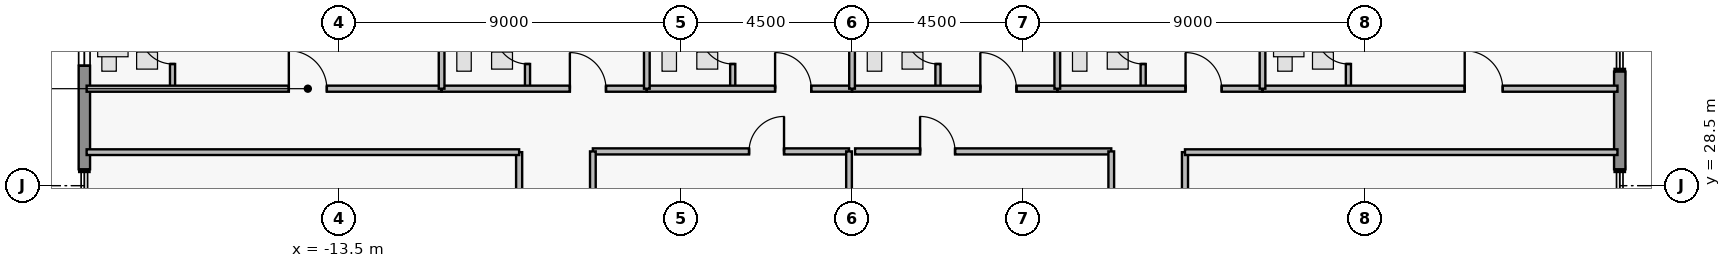
"""IFC4 building model, lengths in metres.
Left out: names, types, materials, properties, quantities, classifications, styles, units other than length and angle.
Written with IfcOpenShell. Run it as: python <this file> out.ifc"""

import sys

from ifc_helpers import new_model, si_unit, direction, frame, frame_2d, origin, place, context, subcontext, project, spatial, rectangle, extrude, element, fill, save


model = new_model("IFC4")
c1 = context("Model", 3, precision=1e-05, world=origin(), true_north=direction((0.0, 1.0)))
c2 = subcontext(c1, "Body", "Model", "MODEL_VIEW")
j1 = project(units=[si_unit("LENGTHUNIT", "METRE"), si_unit("PLANEANGLEUNIT", "RADIAN")], contexts=[c1])
p1 = place(None, origin())
s1 = spatial("IfcSite", under=j1, at=p1, CompositionType="ELEMENT")
p2 = place(p1, origin())
s2 = spatial("IfcBuilding", under=s1, at=p2, CompositionType="ELEMENT")
p3 = place(p2, frame((0.0, 0.0, 272.95)))
s3 = spatial("IfcBuildingStorey", under=s2, at=p3, CompositionType="ELEMENT", Elevation=272.95)
p4 = place(p3, frame((-20.2, 28.93, 0.0), z_axis=(0.0, 0.0, 1.0), x_axis=(0.0, 1.0, 0.0)))
e1 = element("IfcWall", 1, at=p4, inside=s3, PredefinedType="STANDARD", context=c2, shape_type="SweptSolid", body=[
    extrude(rectangle(XDim=6.67, YDim=0.3, at=frame_2d((3.335, 0.0))), origin(), (0.0, 0.0, 1.0), 3.48),
])
p5 = place(p4, frame((2.725, 0.0, 0.95)))
e2 = element("IfcOpeningElement", 2, at=p5, cuts=e1, PredefinedType="OPENING", context=c2, shape_type="SweptSolid", body=[
    extrude(rectangle(XDim=1.15, YDim=1.55, at=frame_2d((0.575, 0.775))), frame((0.0, 0.16, 0.0), z_axis=(0.0, -1.0, 0.0), x_axis=(1.0, 0.0, 0.0)), (0.0, 0.0, 1.0), 0.32),
])
p6 = place(p4, frame((4.94, 0.0, 0.95)))
e3 = element("IfcOpeningElement", 3, at=p6, cuts=e1, PredefinedType="OPENING", context=c2, shape_type="SweptSolid", body=[
    extrude(rectangle(XDim=1.15, YDim=1.55, at=frame_2d((0.575, 0.775))), frame((0.0, 0.16, 0.0), z_axis=(0.0, -1.0, 0.0), x_axis=(1.0, 0.0, 0.0)), (0.0, 0.0, 1.0), 0.32),
])
p7 = place(p3, frame((20.2, 31.5, 0.0), z_axis=(0.0, 0.0, 1.0), x_axis=(0.0, -1.0, 0.0)))
e4 = element("IfcWall", 4, at=p7, inside=s3, PredefinedType="STANDARD", context=c2, shape_type="SweptSolid", body=[
    extrude(rectangle(XDim=2.57, YDim=0.3, at=frame_2d((1.285, 0.0))), origin(), (0.0, 0.0, 1.0), 3.48),
])
p8 = place(p3, frame((-17.88, 31.05, 0.0), z_axis=(0.0, 0.0, 1.0), x_axis=(0.0, 1.0, 0.0)))
e5 = element("IfcWall", 5, at=p8, inside=s3, PredefinedType="PLUMBINGWALL", context=c2, shape_type="SweptSolid", body=[
    extrude(rectangle(XDim=2.36, YDim=0.135, at=frame_2d((1.18, 0.0))), origin(), (0.0, 0.0, 1.0), 3.48),
])
p9 = place(p8, frame((0.65, 0.0, 0.0)))
e6 = element("IfcOpeningElement", 6, at=p9, cuts=e5, PredefinedType="OPENING", context=c2, shape_type="SweptSolid", body=[
    extrude(rectangle(XDim=0.85, YDim=2.1, at=frame_2d((0.425, 1.05))), frame((0.0, 0.077, 0.0), z_axis=(0.0, -1.0, 0.0), x_axis=(1.0, 0.0, 0.0)), (0.0, 0.0, 1.0), 0.155),
])
p10 = place(p3, frame((-20.14, 31.05, 0.0), z_axis=(0.0, 0.0, 1.0), x_axis=(1.0, 0.0, 0.0)))
e7 = element("IfcWall", 7, at=p10, inside=s3, PredefinedType="PARTITIONING", context=c2, shape_type="SweptSolid", body=[
    extrude(rectangle(XDim=9.34, YDim=0.16, at=frame_2d((4.67, 0.0))), origin(), (0.0, 0.0, 1.0), 3.48),
])
p11 = place(p10, frame((5.32, 0.0, 0.0)))
e8 = element("IfcOpeningElement", 8, at=p11, cuts=e7, PredefinedType="OPENING", context=c2, shape_type="SweptSolid", body=[
    extrude(rectangle(XDim=1.0, YDim=2.15, at=frame_2d((0.5, 1.075))), frame((0.0, 0.09, 0.0), z_axis=(0.0, -1.0, 0.0), x_axis=(1.0, 0.0, 0.0)), (0.0, 0.0, 1.0), 0.18),
])
p12 = place(p3, frame((-8.54, 31.05, 0.0), z_axis=(0.0, 0.0, 1.0), x_axis=(0.0, 1.0, 0.0)))
e9 = element("IfcWall", 9, at=p12, inside=s3, PredefinedType="PLUMBINGWALL", context=c2, shape_type="SweptSolid", body=[
    extrude(rectangle(XDim=2.36, YDim=0.135, at=frame_2d((1.18, 0.0))), origin(), (0.0, 0.0, 1.0), 3.48),
])
p13 = place(p12, frame((0.65, 0.0, 0.0)))
e10 = element("IfcOpeningElement", 10, at=p13, cuts=e9, PredefinedType="OPENING", context=c2, shape_type="SweptSolid", body=[
    extrude(rectangle(XDim=0.85, YDim=2.1, at=frame_2d((0.425, 1.05))), frame((0.0, 0.077, 0.0), z_axis=(0.0, -1.0, 0.0), x_axis=(1.0, 0.0, 0.0)), (0.0, 0.0, 1.0), 0.155),
])
p14 = place(p3, frame((-10.8, 31.05, 0.0), z_axis=(0.0, 0.0, 1.0), x_axis=(1.0, 0.0, 0.0)))
e11 = element("IfcWall", 11, at=p14, inside=s3, PredefinedType="PARTITIONING", context=c2, shape_type="SweptSolid", body=[
    extrude(rectangle(XDim=5.4, YDim=0.16, at=frame_2d((2.7, 0.0))), origin(), (0.0, 0.0, 1.0), 3.48),
])
p15 = place(p14, frame((3.375, 0.0, 0.0)))
e12 = element("IfcOpeningElement", 12, at=p15, cuts=e11, PredefinedType="OPENING", context=c2, shape_type="SweptSolid", body=[
    extrude(rectangle(XDim=0.95, YDim=2.15, at=frame_2d((0.475, 1.075))), frame((0.0, 0.09, 0.0), z_axis=(0.0, -1.0, 0.0), x_axis=(1.0, 0.0, 0.0)), (0.0, 0.0, 1.0), 0.18),
])
p16 = place(p3, frame((-3.14, 31.05, 0.0), z_axis=(0.0, 0.0, 1.0), x_axis=(0.0, 1.0, 0.0)))
e13 = element("IfcWall", 13, at=p16, inside=s3, PredefinedType="PLUMBINGWALL", context=c2, shape_type="SweptSolid", body=[
    extrude(rectangle(XDim=2.36, YDim=0.135, at=frame_2d((1.18, 0.0))), origin(), (0.0, 0.0, 1.0), 3.48),
])
p17 = place(p16, frame((0.65, 0.0, 0.0)))
e14 = element("IfcOpeningElement", 14, at=p17, cuts=e13, PredefinedType="OPENING", context=c2, shape_type="SweptSolid", body=[
    extrude(rectangle(XDim=0.85, YDim=2.1, at=frame_2d((0.425, 1.05))), frame((0.0, 0.077, 0.0), z_axis=(0.0, -1.0, 0.0), x_axis=(1.0, 0.0, 0.0)), (0.0, 0.0, 1.0), 0.155),
])
p18 = place(p3, frame((-5.4, 31.05, 0.0), z_axis=(0.0, 0.0, 1.0), x_axis=(1.0, 0.0, 0.0)))
e15 = element("IfcWall", 15, at=p18, inside=s3, PredefinedType="PARTITIONING", context=c2, shape_type="SweptSolid", body=[
    extrude(rectangle(XDim=5.4, YDim=0.16, at=frame_2d((2.7, 0.0))), origin(), (0.0, 0.0, 1.0), 3.48),
])
p19 = place(p18, frame((3.375, 0.0, 0.0)))
e16 = element("IfcOpeningElement", 16, at=p19, cuts=e15, PredefinedType="OPENING", context=c2, shape_type="SweptSolid", body=[
    extrude(rectangle(XDim=0.95, YDim=2.15, at=frame_2d((0.475, 1.075))), frame((0.0, 0.09, 0.0), z_axis=(0.0, -1.0, 0.0), x_axis=(1.0, 0.0, 0.0)), (0.0, 0.0, 1.0), 0.18),
])
p20 = place(p3, frame((2.26, 31.05, 0.0), z_axis=(0.0, 0.0, 1.0), x_axis=(0.0, 1.0, 0.0)))
e17 = element("IfcWall", 17, at=p20, inside=s3, PredefinedType="PLUMBINGWALL", context=c2, shape_type="SweptSolid", body=[
    extrude(rectangle(XDim=2.36, YDim=0.135, at=frame_2d((1.18, 0.0))), origin(), (0.0, 0.0, 1.0), 3.48),
])
p21 = place(p20, frame((0.65, 0.0, 0.0)))
e18 = element("IfcOpeningElement", 18, at=p21, cuts=e17, PredefinedType="OPENING", context=c2, shape_type="SweptSolid", body=[
    extrude(rectangle(XDim=0.85, YDim=2.1, at=frame_2d((0.425, 1.05))), frame((0.0, 0.077, 0.0), z_axis=(0.0, -1.0, 0.0), x_axis=(1.0, 0.0, 0.0)), (0.0, 0.0, 1.0), 0.155),
])
p22 = place(p3, frame((0.0, 31.05, 0.0), z_axis=(0.0, 0.0, 1.0), x_axis=(1.0, 0.0, 0.0)))
e19 = element("IfcWall", 19, at=p22, inside=s3, PredefinedType="PARTITIONING", context=c2, shape_type="SweptSolid", body=[
    extrude(rectangle(XDim=5.4, YDim=0.16, at=frame_2d((2.7, 0.0))), origin(), (0.0, 0.0, 1.0), 3.48),
])
p23 = place(p22, frame((3.375, 0.0, 0.0)))
e20 = element("IfcOpeningElement", 20, at=p23, cuts=e19, PredefinedType="OPENING", context=c2, shape_type="SweptSolid", body=[
    extrude(rectangle(XDim=0.95, YDim=2.15, at=frame_2d((0.475, 1.075))), frame((0.0, 0.09, 0.0), z_axis=(0.0, -1.0, 0.0), x_axis=(1.0, 0.0, 0.0)), (0.0, 0.0, 1.0), 0.18),
])
p24 = place(p3, frame((7.66, 31.05, 0.0), z_axis=(0.0, 0.0, 1.0), x_axis=(0.0, 1.0, 0.0)))
e21 = element("IfcWall", 21, at=p24, inside=s3, PredefinedType="PLUMBINGWALL", context=c2, shape_type="SweptSolid", body=[
    extrude(rectangle(XDim=2.36, YDim=0.135, at=frame_2d((1.18, 0.0))), origin(), (0.0, 0.0, 1.0), 3.48),
])
p25 = place(p24, frame((0.65, 0.0, 0.0)))
e22 = element("IfcOpeningElement", 22, at=p25, cuts=e21, PredefinedType="OPENING", context=c2, shape_type="SweptSolid", body=[
    extrude(rectangle(XDim=0.85, YDim=2.1, at=frame_2d((0.425, 1.05))), frame((0.0, 0.077, 0.0), z_axis=(0.0, -1.0, 0.0), x_axis=(1.0, 0.0, 0.0)), (0.0, 0.0, 1.0), 0.155),
])
p26 = place(p3, frame((5.4, 31.05, 0.0), z_axis=(0.0, 0.0, 1.0), x_axis=(1.0, 0.0, 0.0)))
e23 = element("IfcWall", 23, at=p26, inside=s3, PredefinedType="PARTITIONING", context=c2, shape_type="SweptSolid", body=[
    extrude(rectangle(XDim=5.4, YDim=0.16, at=frame_2d((2.7, 0.0))), origin(), (0.0, 0.0, 1.0), 3.48),
])
p27 = place(p26, frame((3.375, 0.0, 0.0)))
e24 = element("IfcOpeningElement", 24, at=p27, cuts=e23, PredefinedType="OPENING", context=c2, shape_type="SweptSolid", body=[
    extrude(rectangle(XDim=0.95, YDim=2.15, at=frame_2d((0.475, 1.075))), frame((0.0, 0.09, 0.0), z_axis=(0.0, -1.0, 0.0), x_axis=(1.0, 0.0, 0.0)), (0.0, 0.0, 1.0), 0.18),
])
p28 = place(p3, frame((13.06, 31.05, 0.0), z_axis=(0.0, 0.0, 1.0), x_axis=(0.0, 1.0, 0.0)))
e25 = element("IfcWall", 25, at=p28, inside=s3, PredefinedType="PLUMBINGWALL", context=c2, shape_type="SweptSolid", body=[
    extrude(rectangle(XDim=2.36, YDim=0.135, at=frame_2d((1.18, 0.0))), origin(), (0.0, 0.0, 1.0), 3.48),
])
p29 = place(p28, frame((0.65, 0.0, 0.0)))
e26 = element("IfcOpeningElement", 26, at=p29, cuts=e25, PredefinedType="OPENING", context=c2, shape_type="SweptSolid", body=[
    extrude(rectangle(XDim=0.85, YDim=2.1, at=frame_2d((0.425, 1.05))), frame((0.0, 0.077, 0.0), z_axis=(0.0, -1.0, 0.0), x_axis=(1.0, 0.0, 0.0)), (0.0, 0.0, 1.0), 0.155),
])
p30 = place(p3, frame((10.8, 31.05, 0.0), z_axis=(0.0, 0.0, 1.0), x_axis=(1.0, 0.0, 0.0)))
e27 = element("IfcWall", 27, at=p30, inside=s3, PredefinedType="PARTITIONING", context=c2, shape_type="SweptSolid", body=[
    extrude(rectangle(XDim=9.34, YDim=0.16, at=frame_2d((4.67, 0.0))), origin(), (0.0, 0.0, 1.0), 3.48),
])
p31 = place(p30, frame((5.32, 0.0, 0.0)))
e28 = element("IfcOpeningElement", 28, at=p31, cuts=e27, PredefinedType="OPENING", context=c2, shape_type="SweptSolid", body=[
    extrude(rectangle(XDim=1.0, YDim=2.15, at=frame_2d((0.5, 1.075))), frame((0.0, 0.09, 0.0), z_axis=(0.0, -1.0, 0.0), x_axis=(1.0, 0.0, 0.0)), (0.0, 0.0, 1.0), 0.18),
])
p32 = place(p3, frame((-6.82, 29.4, 0.0), z_axis=(0.0, 0.0, 1.0), x_axis=(1.0, 0.0, 0.0)))
e29 = element("IfcWall", 29, at=p32, inside=s3, PredefinedType="PARTITIONING", context=c2, shape_type="SweptSolid", body=[
    extrude(rectangle(XDim=6.74, YDim=0.16, at=frame_2d((3.37, 0.0))), origin(), (0.0, 0.0, 1.0), 3.48),
])
p33 = place(p32, frame((4.11, 0.0, 0.0)))
e30 = element("IfcOpeningElement", 30, at=p33, cuts=e29, PredefinedType="OPENING", context=c2, shape_type="SweptSolid", body=[
    extrude(rectangle(XDim=0.92, YDim=2.12, at=frame_2d((0.46, 1.06))), frame((0.0, 0.09, 0.0), z_axis=(0.0, -1.0, 0.0), x_axis=(1.0, 0.0, 0.0)), (0.0, 0.0, 1.0), 0.18),
])
p34 = place(p3, frame((0.08, 29.4, 0.0), z_axis=(0.0, 0.0, 1.0), x_axis=(1.0, 0.0, 0.0)))
e31 = element("IfcWall", 31, at=p34, inside=s3, PredefinedType="PARTITIONING", context=c2, shape_type="SweptSolid", body=[
    extrude(rectangle(XDim=6.74, YDim=0.16, at=frame_2d((3.37, 0.0))), origin(), (0.0, 0.0, 1.0), 3.48),
])
p35 = place(p34, frame((1.71, 0.0, 0.0)))
e32 = element("IfcOpeningElement", 32, at=p35, cuts=e31, PredefinedType="OPENING", context=c2, shape_type="SweptSolid", body=[
    extrude(rectangle(XDim=0.92, YDim=2.12, at=frame_2d((0.46, 1.06))), frame((0.0, 0.09, 0.0), z_axis=(0.0, -1.0, 0.0), x_axis=(1.0, 0.0, 0.0)), (0.0, 0.0, 1.0), 0.18),
])
p36 = place(p3, frame((-8.76, 23.81, 0.0), z_axis=(0.0, 0.0, 1.0), x_axis=(0.0, 1.0, 0.0)))
e33 = element("IfcWall", 33, at=p36, inside=s3, PredefinedType="PARTITIONING", context=c2, shape_type="SweptSolid", body=[
    extrude(rectangle(XDim=5.57, YDim=0.16, at=frame_2d((2.785, 0.0))), origin(), (0.0, 0.0, 1.0), 3.48),
])
p37 = place(p36, frame((2.325, 0.0, 0.0)))
e34 = element("IfcOpeningElement", 34, at=p37, cuts=e33, PredefinedType="OPENING", context=c2, shape_type="SweptSolid", body=[
    extrude(rectangle(XDim=0.92, YDim=2.12, at=frame_2d((0.46, 1.06))), frame((0.0, 0.09, 0.0), z_axis=(0.0, -1.0, 0.0), x_axis=(1.0, 0.0, 0.0)), (0.0, 0.0, 1.0), 0.18),
])
p38 = place(p3, frame((8.76, 23.81, 0.0), z_axis=(0.0, 0.0, 1.0), x_axis=(0.0, 1.0, 0.0)))
e35 = element("IfcWall", 35, at=p38, inside=s3, PredefinedType="PARTITIONING", context=c2, shape_type="SweptSolid", body=[
    extrude(rectangle(XDim=5.57, YDim=0.16, at=frame_2d((2.785, 0.0))), origin(), (0.0, 0.0, 1.0), 3.48),
])
p39 = place(p38, frame((2.325, 0.0, 0.0)))
e36 = element("IfcOpeningElement", 36, at=p39, cuts=e35, PredefinedType="OPENING", context=c2, shape_type="SweptSolid", body=[
    extrude(rectangle(XDim=0.92, YDim=2.12, at=frame_2d((0.46, 1.06))), frame((0.0, 0.09, 0.0), z_axis=(0.0, -1.0, 0.0), x_axis=(1.0, 0.0, 0.0)), (0.0, 0.0, 1.0), 0.18),
])
for number, where, z_axis, x_axis in (
    (37, (-10.8, 31.05, 0.0), (0.0, 0.0, 1.0), (0.0, 1.0, 0.0)),
    (38, (-5.4, 31.05, 0.0), (0.0, 0.0, 1.0), (0.0, 1.0, 0.0)),
    (39, (0.0, 31.05, 0.0), (0.0, 0.0, 1.0), (0.0, 1.0, 0.0)),
    (40, (5.4, 31.05, 0.0), (0.0, 0.0, 1.0), (0.0, 1.0, 0.0)),
    (41, (10.8, 31.05, 0.0), (0.0, 0.0, 1.0), (0.0, 1.0, 0.0)),
):
    element("IfcWall", number, at=place(p3, frame(where, z_axis=z_axis, x_axis=x_axis)), inside=s3, PredefinedType="PARTITIONING", context=c2, shape_type="SweptSolid", body=[
        extrude(rectangle(XDim=7.87, YDim=0.15, at=frame_2d((3.935, 0.0))), origin(), (0.0, 0.0, 1.0), 3.48),
    ])
for number, where, z_axis, x_axis in (
    (42, (-6.82, 27.0, 0.0), (0.0, 0.0, 1.0), (0.0, 1.0, 0.0)),
    (43, (-0.08, 27.0, 0.0), (0.0, 0.0, 1.0), (0.0, 1.0, 0.0)),
    (44, (6.82, 27.0, 0.0), (0.0, 0.0, 1.0), (0.0, 1.0, 0.0)),
):
    element("IfcWall", number, at=place(p3, frame(where, z_axis=z_axis, x_axis=x_axis)), inside=s3, PredefinedType="PARTITIONING", context=c2, shape_type="SweptSolid", body=[
        extrude(rectangle(XDim=2.4, YDim=0.15, at=frame_2d((1.2, 0.0))), origin(), (0.0, 0.0, 1.0), 3.48),
    ])
for number, where, z_axis, x_axis in (
    (45, (-20.14, 29.38, 0.0), (0.0, 0.0, 1.0), (1.0, 0.0, 0.0)),
    (46, (8.76, 29.38, 0.0), (0.0, 0.0, 1.0), (1.0, 0.0, 0.0)),
):
    element("IfcWall", number, at=place(p3, frame(where, z_axis=z_axis, x_axis=x_axis)), inside=s3, PredefinedType="PARTITIONING", context=c2, shape_type="SweptSolid", body=[
        extrude(rectangle(XDim=11.38, YDim=0.15, at=frame_2d((5.69, 0.0))), origin(), (0.0, 0.0, 1.0), 3.48),
    ])
p40 = place(p5, origin())
e47 = element("IfcWindow", 47, at=p40, inside=s3, PartitioningType="SINGLE_PANEL", PredefinedType="WINDOW", context=c2, shape_type="SweptSolid", body=[
    extrude(rectangle(XDim=1.15, YDim=1.55, at=frame_2d((0.575, 0.775))), frame((0.0, 0.03, 0.0), z_axis=(0.0, -1.0, 0.0), x_axis=(1.0, 0.0, 0.0)), (0.0, 0.0, 1.0), 0.06),
])
fill(e2, e47)
p41 = place(p9, origin())
e48 = element("IfcDoor", 48, at=p41, inside=s3, OperationType="SINGLE_SWING_RIGHT", PredefinedType="DOOR", context=c2, shape_type="SweptSolid", body=[
    extrude(rectangle(XDim=0.85, YDim=2.1, at=frame_2d((0.425, 1.05))), frame((0.0, 0.025, 0.0), z_axis=(0.0, -1.0, 0.0), x_axis=(1.0, 0.0, 0.0)), (0.0, 0.0, 1.0), 0.05),
])
fill(e6, e48)
p42 = place(p11, origin())
e49 = element("IfcDoor", 49, at=p42, inside=s3, OperationType="SINGLE_SWING_LEFT", PredefinedType="DOOR", context=c2, shape_type="SweptSolid", body=[
    extrude(rectangle(XDim=1.0, YDim=2.15, at=frame_2d((0.5, 1.075))), frame((0.0, 0.025, 0.0), z_axis=(0.0, -1.0, 0.0), x_axis=(1.0, 0.0, 0.0)), (0.0, 0.0, 1.0), 0.05),
])
fill(e8, e49)
p43 = place(p13, origin())
e50 = element("IfcDoor", 50, at=p43, inside=s3, OperationType="SINGLE_SWING_RIGHT", PredefinedType="DOOR", context=c2, shape_type="SweptSolid", body=[
    extrude(rectangle(XDim=0.85, YDim=2.1, at=frame_2d((0.425, 1.05))), frame((0.0, 0.025, 0.0), z_axis=(0.0, -1.0, 0.0), x_axis=(1.0, 0.0, 0.0)), (0.0, 0.0, 1.0), 0.05),
])
fill(e10, e50)
p44 = place(p15, origin())
e51 = element("IfcDoor", 51, at=p44, inside=s3, OperationType="SINGLE_SWING_LEFT", PredefinedType="DOOR", context=c2, shape_type="SweptSolid", body=[
    extrude(rectangle(XDim=0.95, YDim=2.15, at=frame_2d((0.475, 1.075))), frame((0.0, 0.025, 0.0), z_axis=(0.0, -1.0, 0.0), x_axis=(1.0, 0.0, 0.0)), (0.0, 0.0, 1.0), 0.05),
])
fill(e12, e51)
p45 = place(p17, origin())
e52 = element("IfcDoor", 52, at=p45, inside=s3, OperationType="SINGLE_SWING_RIGHT", PredefinedType="DOOR", context=c2, shape_type="SweptSolid", body=[
    extrude(rectangle(XDim=0.85, YDim=2.1, at=frame_2d((0.425, 1.05))), frame((0.0, 0.025, 0.0), z_axis=(0.0, -1.0, 0.0), x_axis=(1.0, 0.0, 0.0)), (0.0, 0.0, 1.0), 0.05),
])
fill(e14, e52)
p46 = place(p19, origin())
e53 = element("IfcDoor", 53, at=p46, inside=s3, OperationType="SINGLE_SWING_LEFT", PredefinedType="DOOR", context=c2, shape_type="SweptSolid", body=[
    extrude(rectangle(XDim=0.95, YDim=2.15, at=frame_2d((0.475, 1.075))), frame((0.0, 0.025, 0.0), z_axis=(0.0, -1.0, 0.0), x_axis=(1.0, 0.0, 0.0)), (0.0, 0.0, 1.0), 0.05),
])
fill(e16, e53)
p47 = place(p21, origin())
e54 = element("IfcDoor", 54, at=p47, inside=s3, OperationType="SINGLE_SWING_RIGHT", PredefinedType="DOOR", context=c2, shape_type="SweptSolid", body=[
    extrude(rectangle(XDim=0.85, YDim=2.1, at=frame_2d((0.425, 1.05))), frame((0.0, 0.025, 0.0), z_axis=(0.0, -1.0, 0.0), x_axis=(1.0, 0.0, 0.0)), (0.0, 0.0, 1.0), 0.05),
])
fill(e18, e54)
p48 = place(p23, origin())
e55 = element("IfcDoor", 55, at=p48, inside=s3, OperationType="SINGLE_SWING_LEFT", PredefinedType="DOOR", context=c2, shape_type="SweptSolid", body=[
    extrude(rectangle(XDim=0.95, YDim=2.15, at=frame_2d((0.475, 1.075))), frame((0.0, 0.025, 0.0), z_axis=(0.0, -1.0, 0.0), x_axis=(1.0, 0.0, 0.0)), (0.0, 0.0, 1.0), 0.05),
])
fill(e20, e55)
p49 = place(p25, origin())
e56 = element("IfcDoor", 56, at=p49, inside=s3, OperationType="SINGLE_SWING_RIGHT", PredefinedType="DOOR", context=c2, shape_type="SweptSolid", body=[
    extrude(rectangle(XDim=0.85, YDim=2.1, at=frame_2d((0.425, 1.05))), frame((0.0, 0.025, 0.0), z_axis=(0.0, -1.0, 0.0), x_axis=(1.0, 0.0, 0.0)), (0.0, 0.0, 1.0), 0.05),
])
fill(e22, e56)
p50 = place(p27, origin())
e57 = element("IfcDoor", 57, at=p50, inside=s3, OperationType="SINGLE_SWING_LEFT", PredefinedType="DOOR", context=c2, shape_type="SweptSolid", body=[
    extrude(rectangle(XDim=0.95, YDim=2.15, at=frame_2d((0.475, 1.075))), frame((0.0, 0.025, 0.0), z_axis=(0.0, -1.0, 0.0), x_axis=(1.0, 0.0, 0.0)), (0.0, 0.0, 1.0), 0.05),
])
fill(e24, e57)
p51 = place(p29, origin())
e58 = element("IfcDoor", 58, at=p51, inside=s3, OperationType="SINGLE_SWING_RIGHT", PredefinedType="DOOR", context=c2, shape_type="SweptSolid", body=[
    extrude(rectangle(XDim=0.85, YDim=2.1, at=frame_2d((0.425, 1.05))), frame((0.0, 0.025, 0.0), z_axis=(0.0, -1.0, 0.0), x_axis=(1.0, 0.0, 0.0)), (0.0, 0.0, 1.0), 0.05),
])
fill(e26, e58)
p52 = place(p31, origin())
e59 = element("IfcDoor", 59, at=p52, inside=s3, OperationType="SINGLE_SWING_LEFT", PredefinedType="DOOR", context=c2, shape_type="SweptSolid", body=[
    extrude(rectangle(XDim=1.0, YDim=2.15, at=frame_2d((0.5, 1.075))), frame((0.0, 0.025, 0.0), z_axis=(0.0, -1.0, 0.0), x_axis=(1.0, 0.0, 0.0)), (0.0, 0.0, 1.0), 0.05),
])
fill(e28, e59)
p53 = place(p33, origin())
e60 = element("IfcDoor", 60, at=p53, inside=s3, OperationType="SINGLE_SWING_RIGHT", PredefinedType="DOOR", context=c2, shape_type="SweptSolid", body=[
    extrude(rectangle(XDim=0.92, YDim=2.12, at=frame_2d((0.46, 1.06))), frame((0.0, 0.025, 0.0), z_axis=(0.0, -1.0, 0.0), x_axis=(1.0, 0.0, 0.0)), (0.0, 0.0, 1.0), 0.05),
])
fill(e30, e60)
p54 = place(p35, origin())
e61 = element("IfcDoor", 61, at=p54, inside=s3, OperationType="SINGLE_SWING_LEFT", PredefinedType="DOOR", context=c2, shape_type="SweptSolid", body=[
    extrude(rectangle(XDim=0.92, YDim=2.12, at=frame_2d((0.46, 1.06))), frame((0.0, 0.025, 0.0), z_axis=(0.0, -1.0, 0.0), x_axis=(1.0, 0.0, 0.0)), (0.0, 0.0, 1.0), 0.05),
])
fill(e32, e61)
save(model, sys.argv[1])
